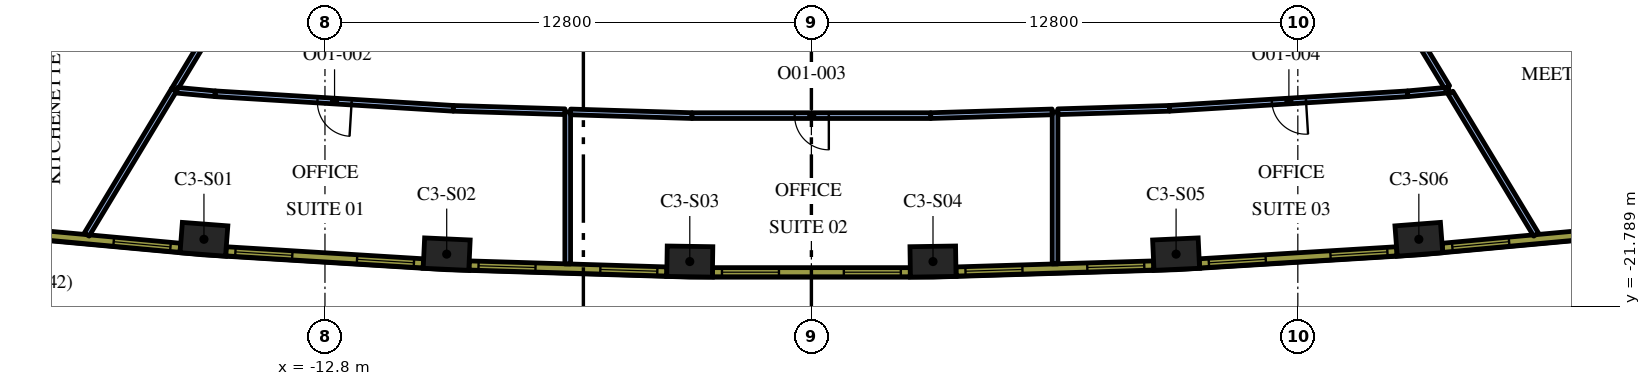
"""IFC4 building model, lengths in metres.
Left out: names, types, materials, properties, quantities, classifications, styles, units other than length and angle.
Written with IfcOpenShell. Run it as: python <this file> out.ifc"""

import sys

from ifc_helpers import new_model, si_unit, direction, frame, frame_2d, origin, origin_2d, place, context, subcontext, project, spatial, rectangle, extrude, element, fill, save


model = new_model("IFC4")
c1 = context("Model", 3, precision=1e-05, world=origin(), true_north=direction((0.0, 1.0)))
c2 = subcontext(c1, "Body", "Model", "MODEL_VIEW")
j1 = project(units=[si_unit("LENGTHUNIT", "METRE"), si_unit("PLANEANGLEUNIT", "RADIAN")], contexts=[c1])
p1 = place(None, origin())
s1 = spatial("IfcSite", under=j1, at=p1, CompositionType="ELEMENT")
p2 = place(p1, origin())
s2 = spatial("IfcBuilding", under=s1, at=p2, CompositionType="ELEMENT")
p3 = place(p2, frame((0.0, 0.0, 141.6)))
s3 = spatial("IfcBuildingStorey", under=s2, at=p3, CompositionType="ELEMENT", Elevation=141.6)
for number, where, z_axis, x_axis in (
    (1, (-15.985, -20.022, 0.0), (0.0, 0.0, 1.0), (0.997, -0.076, 0.0)),
    (2, (-9.597, -20.413, 0.0), (0.0, 0.0, 1.0), (0.999, -0.046, 0.0)),
    (3, (-3.2, -20.608, 0.0), (0.0, 0.0, 1.0), (1.0, -0.015, 0.0)),
    (4, (3.2, -20.608, 0.0), (0.0, 0.0, 1.0), (1.0, 0.015, 0.0)),
    (5, (9.597, -20.413, 0.0), (0.0, 0.0, 1.0), (0.999, 0.046, 0.0)),
    (6, (15.985, -20.022, 0.0), (0.0, 0.0, 1.0), (0.997, 0.076, 0.0)),
):
    element("IfcColumn", number, at=place(p3, frame(where, z_axis=z_axis, x_axis=x_axis)), inside=s3, PredefinedType="COLUMN", context=c2, shape_type="SweptSolid", body=[
        extrude(rectangle(XDim=1.2, YDim=0.8, at=origin_2d()), origin(), (0.0, 0.0, 1.0), 4.2),
    ])
p4 = place(p3, frame((-16.771, -16.09, 0.0), z_axis=(0.0, 0.0, 1.0), x_axis=(-0.516817512045, -0.856095590015, 0.0)))
e7 = element("IfcWall", 7, at=p4, inside=s3, PredefinedType="PARTITIONING", context=c2, shape_type="SweptSolid", body=[
    extrude(rectangle(XDim=4.45, YDim=0.15, at=frame_2d((2.225, 0.0))), origin(), (0.0, 0.0, 1.0), 3.15),
])
p5 = place(p3, frame((-16.775, -16.097, 0.0), z_axis=(0.0, 0.0, 1.0), x_axis=(0.516793803756, 0.856109902057, 0.0)))
e8 = element("IfcWall", 8, at=p5, inside=s3, PredefinedType="PARTITIONING", context=c2, shape_type="SweptSolid", body=[
    extrude(rectangle(XDim=3.856, YDim=0.15, at=frame_2d((1.928, 0.0))), origin(), (0.0, 0.0, 1.0), 3.15),
])
p6 = place(p5, frame((1.456, 0.0, 0.0)))
e9 = element("IfcOpeningElement", 9, at=p6, cuts=e8, PredefinedType="OPENING", context=c2, shape_type="SweptSolid", body=[
    extrude(rectangle(XDim=0.9, YDim=2.1, at=frame_2d((0.45, 1.05))), frame((0.0, 0.085, 0.0), z_axis=(0.0, -1.0, 0.0), x_axis=(1.0, 0.0, 0.0)), (0.0, 0.0, 1.0), 0.17),
])
p7 = place(p3, frame((-6.412, -16.668, 0.0), z_axis=(0.0, 0.0, 1.0), x_axis=(0.0, -1.0, 0.0)))
e10 = element("IfcWall", 10, at=p7, inside=s3, PredefinedType="PARTITIONING", context=c2, shape_type="SweptSolid", body=[
    extrude(rectangle(XDim=4.002, YDim=0.15, at=frame_2d((2.001, 0.0))), origin(), (0.0, 0.0, 1.0), 3.15),
])
p8 = place(p3, frame((-16.69, -16.102, 0.0), z_axis=(0.0, 0.0, 1.0), x_axis=(0.995818997537, -0.091348366946, 0.0)))
e11 = element("IfcWall", 11, at=p8, inside=s3, PredefinedType="PARTITIONING", context=c2, shape_type="SweptSolid", body=[
    extrude(rectangle(XDim=1.002, YDim=0.15, at=frame_2d((0.501, 0.0))), origin(), (0.0, 0.0, 1.0), 3.15),
])
p9 = place(p3, frame((-9.421, -16.576, 0.0), z_axis=(0.0, 0.0, 1.0), x_axis=(-0.998137075468, 0.061011298754, 0.0)))
e12 = element("IfcWall", 12, at=p9, inside=s3, PredefinedType="PARTITIONING", context=c2, shape_type="SweptSolid", body=[
    extrude(rectangle(XDim=6.282, YDim=0.15, at=frame_2d((3.141, 0.0))), origin(), (0.0, 0.0, 1.0), 3.15),
])
p10 = place(p9, frame((2.683, 0.0, 0.0)))
e13 = element("IfcOpeningElement", 13, at=p10, cuts=e12, PredefinedType="OPENING", context=c2, shape_type="SweptSolid", body=[
    extrude(rectangle(XDim=0.9, YDim=2.1, at=frame_2d((0.45, 1.05))), frame((0.0, 0.085, 0.0), z_axis=(0.0, -1.0, 0.0), x_axis=(1.0, 0.0, 0.0)), (0.0, 0.0, 1.0), 0.17),
])
p11 = place(p3, frame((-9.421, -16.576, 0.0), z_axis=(0.0, 0.0, 1.0), x_axis=(0.999533978083, -0.030525835896, 0.0)))
e14 = element("IfcWall", 14, at=p11, inside=s3, PredefinedType="PARTITIONING", context=c2, shape_type="SweptSolid", body=[
    extrude(rectangle(XDim=2.935, YDim=0.15, at=frame_2d((1.468, 0.0))), origin(), (0.0, 0.0, 1.0), 3.15),
])
p12 = place(p3, frame((6.412, -16.668, 0.0), z_axis=(0.0, 0.0, 1.0), x_axis=(0.0, -1.0, 0.0)))
e15 = element("IfcWall", 15, at=p12, inside=s3, PredefinedType="PARTITIONING", context=c2, shape_type="SweptSolid", body=[
    extrude(rectangle(XDim=4.002, YDim=0.15, at=frame_2d((2.001, 0.0))), origin(), (0.0, 0.0, 1.0), 3.15),
])
p13 = place(p3, frame((-6.337, -16.671, 0.0), z_axis=(0.0, 0.0, 1.0), x_axis=(0.999533369646, -0.030545751995, 0.0)))
e16 = element("IfcWall", 16, at=p13, inside=s3, PredefinedType="PARTITIONING", context=c2, shape_type="SweptSolid", body=[
    extrude(rectangle(XDim=3.197, YDim=0.15, at=frame_2d((1.599, 0.0))), origin(), (0.0, 0.0, 1.0), 3.15),
])
p14 = place(p3, frame((3.141, -16.768, 0.0), z_axis=(0.0, 0.0, 1.0), x_axis=(-1.0, 0.0, 0.0)))
e17 = element("IfcWall", 17, at=p14, inside=s3, PredefinedType="PARTITIONING", context=c2, shape_type="SweptSolid", body=[
    extrude(rectangle(XDim=6.283, YDim=0.15, at=frame_2d((3.141, 0.0))), origin(), (0.0, 0.0, 1.0), 3.15),
])
p15 = place(p14, frame((2.683, 0.0, 0.0)))
e18 = element("IfcOpeningElement", 18, at=p15, cuts=e17, PredefinedType="OPENING", context=c2, shape_type="SweptSolid", body=[
    extrude(rectangle(XDim=0.9, YDim=2.1, at=frame_2d((0.45, 1.05))), frame((0.0, 0.085, 0.0), z_axis=(0.0, -1.0, 0.0), x_axis=(1.0, 0.0, 0.0)), (0.0, 0.0, 1.0), 0.17),
])
p16 = place(p3, frame((3.141, -16.768, 0.0), z_axis=(0.0, 0.0, 1.0), x_axis=(0.999533369646, 0.030545751995, 0.0)))
e19 = element("IfcWall", 19, at=p16, inside=s3, PredefinedType="PARTITIONING", context=c2, shape_type="SweptSolid", body=[
    extrude(rectangle(XDim=3.197, YDim=0.15, at=frame_2d((1.599, 0.0))), origin(), (0.0, 0.0, 1.0), 3.15),
])
p17 = place(p3, frame((6.487, -16.666, 0.0), z_axis=(0.0, 0.0, 1.0), x_axis=(0.999533978083, 0.030525835896, 0.0)))
e20 = element("IfcWall", 20, at=p17, inside=s3, PredefinedType="PARTITIONING", context=c2, shape_type="SweptSolid", body=[
    extrude(rectangle(XDim=2.935, YDim=0.15, at=frame_2d((1.468, 0.0))), origin(), (0.0, 0.0, 1.0), 3.15),
])
p18 = place(p3, frame((15.692, -16.193, 0.0), z_axis=(0.0, 0.0, 1.0), x_axis=(-0.998137075468, -0.061011298754, 0.0)))
e21 = element("IfcWall", 21, at=p18, inside=s3, PredefinedType="PARTITIONING", context=c2, shape_type="SweptSolid", body=[
    extrude(rectangle(XDim=6.282, YDim=0.15, at=frame_2d((3.141, 0.0))), origin(), (0.0, 0.0, 1.0), 3.15),
])
p19 = place(p18, frame((2.683, 0.0, 0.0)))
e22 = element("IfcOpeningElement", 22, at=p19, cuts=e21, PredefinedType="OPENING", context=c2, shape_type="SweptSolid", body=[
    extrude(rectangle(XDim=0.9, YDim=2.1, at=frame_2d((0.45, 1.05))), frame((0.0, 0.085, 0.0), z_axis=(0.0, -1.0, 0.0), x_axis=(1.0, 0.0, 0.0)), (0.0, 0.0, 1.0), 0.17),
])
p20 = place(p3, frame((15.692, -16.193, 0.0), z_axis=(0.0, 0.0, 1.0), x_axis=(0.995822859979, 0.091306251389, 0.0)))
e23 = element("IfcWall", 23, at=p20, inside=s3, PredefinedType="PARTITIONING", context=c2, shape_type="SweptSolid", body=[
    extrude(rectangle(XDim=1.086, YDim=0.15, at=frame_2d((0.543, 0.0))), origin(), (0.0, 0.0, 1.0), 3.15),
])
p21 = place(p3, frame((16.816, -16.165, 0.0), z_axis=(0.0, 0.0, 1.0), x_axis=(0.516814925326, -0.85609715159, 0.0)))
e24 = element("IfcWall", 24, at=p21, inside=s3, PredefinedType="PARTITIONING", context=c2, shape_type="SweptSolid", body=[
    extrude(rectangle(XDim=4.362, YDim=0.15, at=frame_2d((2.181, 0.0))), origin(), (0.0, 0.0, 1.0), 3.15),
])
p22 = place(p3, frame((14.782, -12.796, 0.0), z_axis=(0.0, 0.0, 1.0), x_axis=(0.516809076879, -0.856100682196, 0.0)))
e25 = element("IfcWall", 25, at=p22, inside=s3, PredefinedType="PARTITIONING", context=c2, shape_type="SweptSolid", body=[
    extrude(rectangle(XDim=3.768, YDim=0.15, at=frame_2d((1.884, 0.0))), origin(), (0.0, 0.0, 1.0), 3.15),
])
p23 = place(p22, frame((1.4, 0.0, 0.0)))
e26 = element("IfcOpeningElement", 26, at=p23, cuts=e25, PredefinedType="OPENING", context=c2, shape_type="SweptSolid", body=[
    extrude(rectangle(XDim=0.9, YDim=2.1, at=frame_2d((0.45, 1.05))), frame((0.0, 0.085, 0.0), z_axis=(0.0, -1.0, 0.0), x_axis=(1.0, 0.0, 0.0)), (0.0, 0.0, 1.0), 0.17),
])
p24 = place(p3, frame((-21.797, -19.77, 0.0), z_axis=(0.0, 0.0, 1.0), x_axis=(0.995808712151, -0.091460422067, 0.0)))
e27 = element("IfcWall", 27, at=p24, inside=s3, PredefinedType="SOLIDWALL", context=c2, shape_type="SweptSolid", body=[
    extrude(rectangle(XDim=5.213, YDim=0.24, at=frame_2d((2.606, 0.0))), origin(), (0.0, 0.0, 1.0), 3.95),
])
p25 = place(p24, frame((0.221, 0.0, 0.9)))
e28 = element("IfcOpeningElement", 28, at=p25, cuts=e27, PredefinedType="OPENING", context=c2, shape_type="SweptSolid", body=[
    extrude(rectangle(XDim=1.5, YDim=2.55, at=frame_2d((0.75, 1.275))), frame((0.0, 0.13, 0.0), z_axis=(0.0, -1.0, 0.0), x_axis=(1.0, 0.0, 0.0)), (0.0, 0.0, 1.0), 0.26),
])
p26 = place(p24, frame((3.452, 0.0, 0.9)))
e29 = element("IfcOpeningElement", 29, at=p26, cuts=e27, PredefinedType="OPENING", context=c2, shape_type="SweptSolid", body=[
    extrude(rectangle(XDim=1.5, YDim=2.55, at=frame_2d((0.75, 1.275))), frame((0.0, 0.13, 0.0), z_axis=(0.0, -1.0, 0.0), x_axis=(1.0, 0.0, 0.0)), (0.0, 0.0, 1.0), 0.26),
])
p27 = place(p3, frame((-15.405, -20.338, 0.0), z_axis=(0.0, 0.0, 1.0), x_axis=(0.998135294646, -0.061040425794, 0.0)))
e30 = element("IfcWall", 30, at=p27, inside=s3, PredefinedType="SOLIDWALL", context=c2, shape_type="SweptSolid", body=[
    extrude(rectangle(XDim=5.204, YDim=0.24, at=frame_2d((2.602, 0.0))), origin(), (0.0, 0.0, 1.0), 3.95),
])
p28 = place(p27, frame((0.248, 0.0, 0.9)))
e31 = element("IfcOpeningElement", 31, at=p28, cuts=e30, PredefinedType="OPENING", context=c2, shape_type="SweptSolid", body=[
    extrude(rectangle(XDim=1.5, YDim=2.55, at=frame_2d((0.75, 1.275))), frame((0.0, 0.13, 0.0), z_axis=(0.0, -1.0, 0.0), x_axis=(1.0, 0.0, 0.0)), (0.0, 0.0, 1.0), 0.26),
])
p29 = place(p27, frame((3.455, 0.0, 0.9)))
e32 = element("IfcOpeningElement", 32, at=p29, cuts=e30, PredefinedType="OPENING", context=c2, shape_type="SweptSolid", body=[
    extrude(rectangle(XDim=1.5, YDim=2.55, at=frame_2d((0.75, 1.275))), frame((0.0, 0.13, 0.0), z_axis=(0.0, -1.0, 0.0), x_axis=(1.0, 0.0, 0.0)), (0.0, 0.0, 1.0), 0.26),
])
p30 = place(p3, frame((-9.007, -20.711, 0.0), z_axis=(0.0, 0.0, 1.0), x_axis=(0.999533441983, -0.030543384845, 0.0)))
e33 = element("IfcWall", 33, at=p30, inside=s3, PredefinedType="SOLIDWALL", context=c2, shape_type="SweptSolid", body=[
    extrude(rectangle(XDim=5.204, YDim=0.24, at=frame_2d((2.602, 0.0))), origin(), (0.0, 0.0, 1.0), 3.95),
])
p31 = place(p30, frame((0.248, 0.0, 0.9)))
e34 = element("IfcOpeningElement", 34, at=p31, cuts=e33, PredefinedType="OPENING", context=c2, shape_type="SweptSolid", body=[
    extrude(rectangle(XDim=1.5, YDim=2.55, at=frame_2d((0.75, 1.275))), frame((0.0, 0.13, 0.0), z_axis=(0.0, -1.0, 0.0), x_axis=(1.0, 0.0, 0.0)), (0.0, 0.0, 1.0), 0.26),
])
p32 = place(p30, frame((3.455, 0.0, 0.9)))
e35 = element("IfcOpeningElement", 35, at=p32, cuts=e33, PredefinedType="OPENING", context=c2, shape_type="SweptSolid", body=[
    extrude(rectangle(XDim=1.5, YDim=2.55, at=frame_2d((0.75, 1.275))), frame((0.0, 0.13, 0.0), z_axis=(0.0, -1.0, 0.0), x_axis=(1.0, 0.0, 0.0)), (0.0, 0.0, 1.0), 0.26),
])
p33 = place(p3, frame((-2.602, -20.888, 0.0), z_axis=(0.0, 0.0, 1.0), x_axis=(1.0, 0.0, 0.0)))
e36 = element("IfcWall", 36, at=p33, inside=s3, PredefinedType="SOLIDWALL", context=c2, shape_type="SweptSolid", body=[
    extrude(rectangle(XDim=5.204, YDim=0.24, at=frame_2d((2.602, 0.0))), origin(), (0.0, 0.0, 1.0), 3.95),
])
p34 = place(p33, frame((0.248, 0.0, 0.9)))
e37 = element("IfcOpeningElement", 37, at=p34, cuts=e36, PredefinedType="OPENING", context=c2, shape_type="SweptSolid", body=[
    extrude(rectangle(XDim=1.5, YDim=2.55, at=frame_2d((0.75, 1.275))), frame((0.0, 0.13, 0.0), z_axis=(0.0, -1.0, 0.0), x_axis=(1.0, 0.0, 0.0)), (0.0, 0.0, 1.0), 0.26),
])
p35 = place(p33, frame((3.455, 0.0, 0.9)))
e38 = element("IfcOpeningElement", 38, at=p35, cuts=e36, PredefinedType="OPENING", context=c2, shape_type="SweptSolid", body=[
    extrude(rectangle(XDim=1.5, YDim=2.55, at=frame_2d((0.75, 1.275))), frame((0.0, 0.13, 0.0), z_axis=(0.0, -1.0, 0.0), x_axis=(1.0, 0.0, 0.0)), (0.0, 0.0, 1.0), 0.26),
])
p36 = place(p3, frame((3.806, -20.87, 0.0), z_axis=(0.0, 0.0, 1.0), x_axis=(0.999533441983, 0.030543384845, 0.0)))
e39 = element("IfcWall", 39, at=p36, inside=s3, PredefinedType="SOLIDWALL", context=c2, shape_type="SweptSolid", body=[
    extrude(rectangle(XDim=5.204, YDim=0.24, at=frame_2d((2.602, 0.0))), origin(), (0.0, 0.0, 1.0), 3.95),
])
p37 = place(p36, frame((0.248, 0.0, 0.9)))
e40 = element("IfcOpeningElement", 40, at=p37, cuts=e39, PredefinedType="OPENING", context=c2, shape_type="SweptSolid", body=[
    extrude(rectangle(XDim=1.5, YDim=2.55, at=frame_2d((0.75, 1.275))), frame((0.0, 0.13, 0.0), z_axis=(0.0, -1.0, 0.0), x_axis=(1.0, 0.0, 0.0)), (0.0, 0.0, 1.0), 0.26),
])
p38 = place(p36, frame((3.455, 0.0, 0.9)))
e41 = element("IfcOpeningElement", 41, at=p38, cuts=e39, PredefinedType="OPENING", context=c2, shape_type="SweptSolid", body=[
    extrude(rectangle(XDim=1.5, YDim=2.55, at=frame_2d((0.75, 1.275))), frame((0.0, 0.13, 0.0), z_axis=(0.0, -1.0, 0.0), x_axis=(1.0, 0.0, 0.0)), (0.0, 0.0, 1.0), 0.26),
])
p39 = place(p3, frame((10.211, -20.656, 0.0), z_axis=(0.0, 0.0, 1.0), x_axis=(0.998135294646, 0.061040425794, 0.0)))
e42 = element("IfcWall", 42, at=p39, inside=s3, PredefinedType="SOLIDWALL", context=c2, shape_type="SweptSolid", body=[
    extrude(rectangle(XDim=5.204, YDim=0.24, at=frame_2d((2.602, 0.0))), origin(), (0.0, 0.0, 1.0), 3.95),
])
p40 = place(p39, frame((0.248, 0.0, 0.9)))
e43 = element("IfcOpeningElement", 43, at=p40, cuts=e42, PredefinedType="OPENING", context=c2, shape_type="SweptSolid", body=[
    extrude(rectangle(XDim=1.5, YDim=2.55, at=frame_2d((0.75, 1.275))), frame((0.0, 0.13, 0.0), z_axis=(0.0, -1.0, 0.0), x_axis=(1.0, 0.0, 0.0)), (0.0, 0.0, 1.0), 0.26),
])
p41 = place(p39, frame((3.455, 0.0, 0.9)))
e44 = element("IfcOpeningElement", 44, at=p41, cuts=e42, PredefinedType="OPENING", context=c2, shape_type="SweptSolid", body=[
    extrude(rectangle(XDim=1.5, YDim=2.55, at=frame_2d((0.75, 1.275))), frame((0.0, 0.13, 0.0), z_axis=(0.0, -1.0, 0.0), x_axis=(1.0, 0.0, 0.0)), (0.0, 0.0, 1.0), 0.26),
])
p42 = place(p3, frame((16.606, -20.247, 0.0), z_axis=(0.0, 0.0, 1.0), x_axis=(0.995808712151, 0.091460422067, 0.0)))
e45 = element("IfcWall", 45, at=p42, inside=s3, PredefinedType="SOLIDWALL", context=c2, shape_type="SweptSolid", body=[
    extrude(rectangle(XDim=5.213, YDim=0.24, at=frame_2d((2.606, 0.0))), origin(), (0.0, 0.0, 1.0), 3.95),
])
p43 = place(p42, frame((0.261, 0.0, 0.9)))
e46 = element("IfcOpeningElement", 46, at=p43, cuts=e45, PredefinedType="OPENING", context=c2, shape_type="SweptSolid", body=[
    extrude(rectangle(XDim=1.5, YDim=2.55, at=frame_2d((0.75, 1.275))), frame((0.0, 0.13, 0.0), z_axis=(0.0, -1.0, 0.0), x_axis=(1.0, 0.0, 0.0)), (0.0, 0.0, 1.0), 0.26),
])
p44 = place(p42, frame((3.492, 0.0, 0.9)))
e47 = element("IfcOpeningElement", 47, at=p44, cuts=e45, PredefinedType="OPENING", context=c2, shape_type="SweptSolid", body=[
    extrude(rectangle(XDim=1.5, YDim=2.55, at=frame_2d((0.75, 1.275))), frame((0.0, 0.13, 0.0), z_axis=(0.0, -1.0, 0.0), x_axis=(1.0, 0.0, 0.0)), (0.0, 0.0, 1.0), 0.26),
])
p45 = place(p10, origin())
e48 = element("IfcDoor", 48, at=p45, inside=s3, OperationType="SINGLE_SWING_LEFT", PredefinedType="DOOR", context=c2, shape_type="SweptSolid", body=[
    extrude(rectangle(XDim=0.9, YDim=2.1, at=frame_2d((0.45, 1.05))), frame((0.0, 0.025, 0.0), z_axis=(0.0, -1.0, 0.0), x_axis=(1.0, 0.0, 0.0)), (0.0, 0.0, 1.0), 0.05),
])
fill(e13, e48)
p46 = place(p15, origin())
e49 = element("IfcDoor", 49, at=p46, inside=s3, OperationType="SINGLE_SWING_LEFT", PredefinedType="DOOR", context=c2, shape_type="SweptSolid", body=[
    extrude(rectangle(XDim=0.9, YDim=2.1, at=frame_2d((0.45, 1.05))), frame((0.0, 0.025, 0.0), z_axis=(0.0, -1.0, 0.0), x_axis=(1.0, 0.0, 0.0)), (0.0, 0.0, 1.0), 0.05),
])
fill(e18, e49)
p47 = place(p19, origin())
e50 = element("IfcDoor", 50, at=p47, inside=s3, OperationType="SINGLE_SWING_LEFT", PredefinedType="DOOR", context=c2, shape_type="SweptSolid", body=[
    extrude(rectangle(XDim=0.9, YDim=2.1, at=frame_2d((0.45, 1.05))), frame((0.0, 0.025, 0.0), z_axis=(0.0, -1.0, 0.0), x_axis=(1.0, 0.0, 0.0)), (0.0, 0.0, 1.0), 0.05),
])
fill(e22, e50)
p48 = place(p26, origin())
e51 = element("IfcWindow", 51, at=p48, inside=s3, PartitioningType="SINGLE_PANEL", PredefinedType="WINDOW", context=c2, shape_type="SweptSolid", body=[
    extrude(rectangle(XDim=1.5, YDim=2.55, at=frame_2d((0.75, 1.275))), frame((0.0, 0.04, 0.0), z_axis=(0.0, -1.0, 0.0), x_axis=(1.0, 0.0, 0.0)), (0.0, 0.0, 1.0), 0.06),
])
fill(e29, e51)
p49 = place(p28, origin())
e52 = element("IfcWindow", 52, at=p49, inside=s3, PartitioningType="SINGLE_PANEL", PredefinedType="WINDOW", context=c2, shape_type="SweptSolid", body=[
    extrude(rectangle(XDim=1.5, YDim=2.55, at=frame_2d((0.75, 1.275))), frame((0.0, 0.04, 0.0), z_axis=(0.0, -1.0, 0.0), x_axis=(1.0, 0.0, 0.0)), (0.0, 0.0, 1.0), 0.06),
])
fill(e31, e52)
p50 = place(p29, origin())
e53 = element("IfcWindow", 53, at=p50, inside=s3, PartitioningType="SINGLE_PANEL", PredefinedType="WINDOW", context=c2, shape_type="SweptSolid", body=[
    extrude(rectangle(XDim=1.5, YDim=2.55, at=frame_2d((0.75, 1.275))), frame((0.0, 0.04, 0.0), z_axis=(0.0, -1.0, 0.0), x_axis=(1.0, 0.0, 0.0)), (0.0, 0.0, 1.0), 0.06),
])
fill(e32, e53)
p51 = place(p31, origin())
e54 = element("IfcWindow", 54, at=p51, inside=s3, PartitioningType="SINGLE_PANEL", PredefinedType="WINDOW", context=c2, shape_type="SweptSolid", body=[
    extrude(rectangle(XDim=1.5, YDim=2.55, at=frame_2d((0.75, 1.275))), frame((0.0, 0.04, 0.0), z_axis=(0.0, -1.0, 0.0), x_axis=(1.0, 0.0, 0.0)), (0.0, 0.0, 1.0), 0.06),
])
fill(e34, e54)
p52 = place(p32, origin())
e55 = element("IfcWindow", 55, at=p52, inside=s3, PartitioningType="SINGLE_PANEL", PredefinedType="WINDOW", context=c2, shape_type="SweptSolid", body=[
    extrude(rectangle(XDim=1.5, YDim=2.55, at=frame_2d((0.75, 1.275))), frame((0.0, 0.04, 0.0), z_axis=(0.0, -1.0, 0.0), x_axis=(1.0, 0.0, 0.0)), (0.0, 0.0, 1.0), 0.06),
])
fill(e35, e55)
p53 = place(p34, origin())
e56 = element("IfcWindow", 56, at=p53, inside=s3, PartitioningType="SINGLE_PANEL", PredefinedType="WINDOW", context=c2, shape_type="SweptSolid", body=[
    extrude(rectangle(XDim=1.5, YDim=2.55, at=frame_2d((0.75, 1.275))), frame((0.0, 0.04, 0.0), z_axis=(0.0, -1.0, 0.0), x_axis=(1.0, 0.0, 0.0)), (0.0, 0.0, 1.0), 0.06),
])
fill(e37, e56)
p54 = place(p35, origin())
e57 = element("IfcWindow", 57, at=p54, inside=s3, PartitioningType="SINGLE_PANEL", PredefinedType="WINDOW", context=c2, shape_type="SweptSolid", body=[
    extrude(rectangle(XDim=1.5, YDim=2.55, at=frame_2d((0.75, 1.275))), frame((0.0, 0.04, 0.0), z_axis=(0.0, -1.0, 0.0), x_axis=(1.0, 0.0, 0.0)), (0.0, 0.0, 1.0), 0.06),
])
fill(e38, e57)
p55 = place(p37, origin())
e58 = element("IfcWindow", 58, at=p55, inside=s3, PartitioningType="SINGLE_PANEL", PredefinedType="WINDOW", context=c2, shape_type="SweptSolid", body=[
    extrude(rectangle(XDim=1.5, YDim=2.55, at=frame_2d((0.75, 1.275))), frame((0.0, 0.04, 0.0), z_axis=(0.0, -1.0, 0.0), x_axis=(1.0, 0.0, 0.0)), (0.0, 0.0, 1.0), 0.06),
])
fill(e40, e58)
p56 = place(p38, origin())
e59 = element("IfcWindow", 59, at=p56, inside=s3, PartitioningType="SINGLE_PANEL", PredefinedType="WINDOW", context=c2, shape_type="SweptSolid", body=[
    extrude(rectangle(XDim=1.5, YDim=2.55, at=frame_2d((0.75, 1.275))), frame((0.0, 0.04, 0.0), z_axis=(0.0, -1.0, 0.0), x_axis=(1.0, 0.0, 0.0)), (0.0, 0.0, 1.0), 0.06),
])
fill(e41, e59)
p57 = place(p40, origin())
e60 = element("IfcWindow", 60, at=p57, inside=s3, PartitioningType="SINGLE_PANEL", PredefinedType="WINDOW", context=c2, shape_type="SweptSolid", body=[
    extrude(rectangle(XDim=1.5, YDim=2.55, at=frame_2d((0.75, 1.275))), frame((0.0, 0.04, 0.0), z_axis=(0.0, -1.0, 0.0), x_axis=(1.0, 0.0, 0.0)), (0.0, 0.0, 1.0), 0.06),
])
fill(e43, e60)
p58 = place(p41, origin())
e61 = element("IfcWindow", 61, at=p58, inside=s3, PartitioningType="SINGLE_PANEL", PredefinedType="WINDOW", context=c2, shape_type="SweptSolid", body=[
    extrude(rectangle(XDim=1.5, YDim=2.55, at=frame_2d((0.75, 1.275))), frame((0.0, 0.04, 0.0), z_axis=(0.0, -1.0, 0.0), x_axis=(1.0, 0.0, 0.0)), (0.0, 0.0, 1.0), 0.06),
])
fill(e44, e61)
p59 = place(p43, origin())
e62 = element("IfcWindow", 62, at=p59, inside=s3, PartitioningType="SINGLE_PANEL", PredefinedType="WINDOW", context=c2, shape_type="SweptSolid", body=[
    extrude(rectangle(XDim=1.5, YDim=2.55, at=frame_2d((0.75, 1.275))), frame((0.0, 0.04, 0.0), z_axis=(0.0, -1.0, 0.0), x_axis=(1.0, 0.0, 0.0)), (0.0, 0.0, 1.0), 0.06),
])
fill(e46, e62)
save(model, sys.argv[1])
